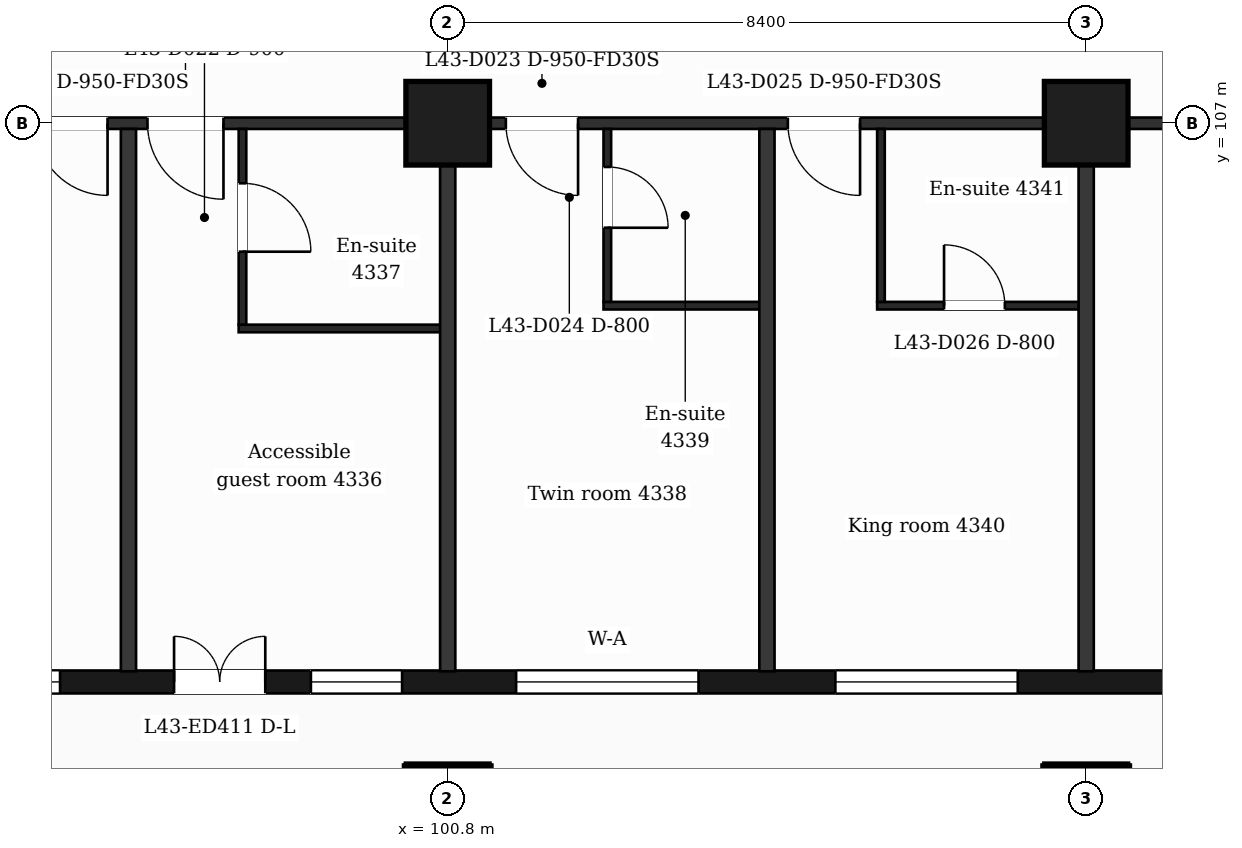
"""IFC4 building model, lengths in metres.
Left out: names, types, materials, properties, quantities, classifications, styles, units other than length and angle.
Written with IfcOpenShell. Run it as: python <this file> out.ifc"""

import sys

from ifc_helpers import new_model, si_unit, direction, frame, frame_2d, origin, origin_2d, place, context, subcontext, project, spatial, rectangle, extrude, element, fill, save


model = new_model("IFC4")
c1 = context("Model", 3, precision=1e-05, world=origin(), true_north=direction((0.0, 1.0)))
c2 = subcontext(c1, "Body", "Model", "MODEL_VIEW")
j1 = project(units=[si_unit("LENGTHUNIT", "METRE"), si_unit("PLANEANGLEUNIT", "RADIAN")], contexts=[c1])
p1 = place(None, origin())
s1 = spatial("IfcSite", under=j1, at=p1, CompositionType="ELEMENT")
p2 = place(p1, origin())
s2 = spatial("IfcBuilding", under=s1, at=p2, CompositionType="ELEMENT")
p3 = place(p2, frame((0.0, 0.0, 181.1)))
s3 = spatial("IfcBuildingStorey", under=s2, at=p3, CompositionType="ELEMENT", Elevation=181.1)
for number, where, z_axis, x_axis in (
    (1, (100.8, 98.0, 0.0), (0.0, 0.0, 1.0), (1.0, 0.0, 0.0)),
    (2, (109.2, 98.0, 0.0), (0.0, 0.0, 1.0), (1.0, 0.0, 0.0)),
    (3, (100.8, 107.0, 0.0), (0.0, 0.0, 1.0), (1.0, 0.0, 0.0)),
    (4, (109.2, 107.0, 0.0), (0.0, 0.0, 1.0), (1.0, 0.0, 0.0)),
):
    element("IfcColumn", number, at=place(p3, frame(where, z_axis=z_axis, x_axis=x_axis)), inside=s3, PredefinedType="COLUMN", context=c2, shape_type="SweptSolid", body=[
        extrude(rectangle(XDim=1.1, YDim=1.1, at=origin_2d()), origin(), (0.0, 0.0, 1.0), 3.7),
    ])
p4 = place(p3, frame((89.85, 99.65, 0.0), z_axis=(0.0, 0.0, 1.0), x_axis=(1.0, 0.0, 0.0)))
e5 = element("IfcWall", 5, at=p4, inside=s3, PredefinedType="SOLIDWALL", context=c2, shape_type="SweptSolid", body=[
    extrude(rectangle(XDim=47.25, YDim=0.3, at=frame_2d((23.625, 0.0))), origin(), (0.0, 0.0, 1.0), 3.38),
])
p5 = place(p4, frame((0.725, 0.0, 0.9)))
e6 = element("IfcOpeningElement", 6, at=p5, cuts=e5, PredefinedType="OPENING", context=c2, shape_type="SweptSolid", body=[
    extrude(rectangle(XDim=1.2, YDim=2.1, at=frame_2d((0.6, 1.05))), frame((0.0, 0.16, 0.0), z_axis=(0.0, -1.0, 0.0), x_axis=(1.0, 0.0, 0.0)), (0.0, 0.0, 1.0), 0.32),
])
p6 = place(p4, frame((3.45, 0.0, 0.9)))
e7 = element("IfcOpeningElement", 7, at=p6, cuts=e5, PredefinedType="OPENING", context=c2, shape_type="SweptSolid", body=[
    extrude(rectangle(XDim=2.4, YDim=2.1, at=frame_2d((1.2, 1.05))), frame((0.0, 0.16, 0.0), z_axis=(0.0, -1.0, 0.0), x_axis=(1.0, 0.0, 0.0)), (0.0, 0.0, 1.0), 0.32),
])
p7 = place(p4, frame((7.35, 0.0, 0.0)))
e8 = element("IfcOpeningElement", 8, at=p7, cuts=e5, PredefinedType="OPENING", context=c2, shape_type="SweptSolid", body=[
    extrude(rectangle(XDim=1.2, YDim=2.4, at=frame_2d((0.6, 1.2))), frame((0.0, 0.16, 0.0), z_axis=(0.0, -1.0, 0.0), x_axis=(1.0, 0.0, 0.0)), (0.0, 0.0, 1.0), 0.32),
])
p8 = place(p4, frame((9.15, 0.0, 0.9)))
e9 = element("IfcOpeningElement", 9, at=p8, cuts=e5, PredefinedType="OPENING", context=c2, shape_type="SweptSolid", body=[
    extrude(rectangle(XDim=1.2, YDim=2.1, at=frame_2d((0.6, 1.05))), frame((0.0, 0.16, 0.0), z_axis=(0.0, -1.0, 0.0), x_axis=(1.0, 0.0, 0.0)), (0.0, 0.0, 1.0), 0.32),
])
p9 = place(p4, frame((11.85, 0.0, 0.9)))
e10 = element("IfcOpeningElement", 10, at=p9, cuts=e5, PredefinedType="OPENING", context=c2, shape_type="SweptSolid", body=[
    extrude(rectangle(XDim=2.4, YDim=2.1, at=frame_2d((1.2, 1.05))), frame((0.0, 0.16, 0.0), z_axis=(0.0, -1.0, 0.0), x_axis=(1.0, 0.0, 0.0)), (0.0, 0.0, 1.0), 0.32),
])
p10 = place(p4, frame((16.05, 0.0, 0.9)))
e11 = element("IfcOpeningElement", 11, at=p10, cuts=e5, PredefinedType="OPENING", context=c2, shape_type="SweptSolid", body=[
    extrude(rectangle(XDim=2.4, YDim=2.1, at=frame_2d((1.2, 1.05))), frame((0.0, 0.16, 0.0), z_axis=(0.0, -1.0, 0.0), x_axis=(1.0, 0.0, 0.0)), (0.0, 0.0, 1.0), 0.32),
])
p11 = place(p4, frame((20.85, 0.0, 0.9)))
e12 = element("IfcOpeningElement", 12, at=p11, cuts=e5, PredefinedType="OPENING", context=c2, shape_type="SweptSolid", body=[
    extrude(rectangle(XDim=1.2, YDim=2.1, at=frame_2d((0.6, 1.05))), frame((0.0, 0.16, 0.0), z_axis=(0.0, -1.0, 0.0), x_axis=(1.0, 0.0, 0.0)), (0.0, 0.0, 1.0), 0.32),
])
p12 = place(p4, frame((25.05, 0.0, 0.9)))
e13 = element("IfcOpeningElement", 13, at=p12, cuts=e5, PredefinedType="OPENING", context=c2, shape_type="SweptSolid", body=[
    extrude(rectangle(XDim=1.2, YDim=2.1, at=frame_2d((0.6, 1.05))), frame((0.0, 0.16, 0.0), z_axis=(0.0, -1.0, 0.0), x_axis=(1.0, 0.0, 0.0)), (0.0, 0.0, 1.0), 0.32),
])
p13 = place(p4, frame((28.65, 0.0, 0.9)))
e14 = element("IfcOpeningElement", 14, at=p13, cuts=e5, PredefinedType="OPENING", context=c2, shape_type="SweptSolid", body=[
    extrude(rectangle(XDim=2.4, YDim=2.1, at=frame_2d((1.2, 1.05))), frame((0.0, 0.16, 0.0), z_axis=(0.0, -1.0, 0.0), x_axis=(1.0, 0.0, 0.0)), (0.0, 0.0, 1.0), 0.32),
])
p14 = place(p4, frame((32.85, 0.0, 0.9)))
e15 = element("IfcOpeningElement", 15, at=p14, cuts=e5, PredefinedType="OPENING", context=c2, shape_type="SweptSolid", body=[
    extrude(rectangle(XDim=2.4, YDim=2.1, at=frame_2d((1.2, 1.05))), frame((0.0, 0.16, 0.0), z_axis=(0.0, -1.0, 0.0), x_axis=(1.0, 0.0, 0.0)), (0.0, 0.0, 1.0), 0.32),
])
p15 = place(p4, frame((37.05, 0.0, 0.9)))
e16 = element("IfcOpeningElement", 16, at=p15, cuts=e5, PredefinedType="OPENING", context=c2, shape_type="SweptSolid", body=[
    extrude(rectangle(XDim=2.4, YDim=2.1, at=frame_2d((1.2, 1.05))), frame((0.0, 0.16, 0.0), z_axis=(0.0, -1.0, 0.0), x_axis=(1.0, 0.0, 0.0)), (0.0, 0.0, 1.0), 0.32),
])
p16 = place(p4, frame((41.25, 0.0, 0.9)))
e17 = element("IfcOpeningElement", 17, at=p16, cuts=e5, PredefinedType="OPENING", context=c2, shape_type="SweptSolid", body=[
    extrude(rectangle(XDim=2.4, YDim=2.1, at=frame_2d((1.2, 1.05))), frame((0.0, 0.16, 0.0), z_axis=(0.0, -1.0, 0.0), x_axis=(1.0, 0.0, 0.0)), (0.0, 0.0, 1.0), 0.32),
])
p17 = place(p4, frame((45.25, 0.0, 0.9)))
e18 = element("IfcOpeningElement", 18, at=p17, cuts=e5, PredefinedType="OPENING", context=c2, shape_type="SweptSolid", body=[
    extrude(rectangle(XDim=1.2, YDim=2.1, at=frame_2d((0.6, 1.05))), frame((0.0, 0.16, 0.0), z_axis=(0.0, -1.0, 0.0), x_axis=(1.0, 0.0, 0.0)), (0.0, 0.0, 1.0), 0.32),
])
p18 = place(p3, frame((98.05, 104.3, 0.0), z_axis=(0.0, 0.0, 1.0), x_axis=(1.0, 0.0, 0.0)))
e19 = element("IfcWall", 19, at=p18, inside=s3, PredefinedType="PARTITIONING", context=c2, shape_type="SweptSolid", body=[
    extrude(rectangle(XDim=2.75, YDim=0.1, at=frame_2d((1.375, 0.0))), origin(), (0.0, 0.0, 1.0), 3.38),
])
p19 = place(p3, frame((102.85, 104.6, 0.0), z_axis=(0.0, 0.0, 1.0), x_axis=(1.0, 0.0, 0.0)))
e20 = element("IfcWall", 20, at=p19, inside=s3, PredefinedType="PARTITIONING", context=c2, shape_type="SweptSolid", body=[
    extrude(rectangle(XDim=2.15, YDim=0.1, at=frame_2d((1.075, 0.0))), origin(), (0.0, 0.0, 1.0), 3.38),
])
p20 = place(p3, frame((106.45, 104.6, 0.0), z_axis=(0.0, 0.0, 1.0), x_axis=(1.0, 0.0, 0.0)))
e21 = element("IfcWall", 21, at=p20, inside=s3, PredefinedType="PARTITIONING", context=c2, shape_type="SweptSolid", body=[
    extrude(rectangle(XDim=2.75, YDim=0.1, at=frame_2d((1.375, 0.0))), origin(), (0.0, 0.0, 1.0), 3.38),
])
p21 = place(p20, frame((0.88, 0.0, 0.0)))
e22 = element("IfcOpeningElement", 22, at=p21, cuts=e21, PredefinedType="OPENING", context=c2, shape_type="SweptSolid", body=[
    extrude(rectangle(XDim=0.8, YDim=2.1, at=frame_2d((0.4, 1.05))), frame((0.0, 0.06, 0.0), z_axis=(0.0, -1.0, 0.0), x_axis=(1.0, 0.0, 0.0)), (0.0, 0.0, 1.0), 0.12),
])
p22 = place(p3, frame((87.018, 107.0, 0.0), z_axis=(0.0, 0.0, 1.0), x_axis=(1.0, 0.0, 0.0)))
e23 = element("IfcWall", 23, at=p22, inside=s3, PredefinedType="PARTITIONING", context=c2, shape_type="SweptSolid", body=[
    extrude(rectangle(XDim=52.765, YDim=0.15, at=frame_2d((26.382, 0.0))), origin(), (0.0, 0.0, 1.0), 3.38),
])
p23 = place(p22, frame((1.276, 0.0, 0.0)))
e24 = element("IfcOpeningElement", 24, at=p23, cuts=e23, PredefinedType="OPENING", context=c2, shape_type="SweptSolid", body=[
    extrude(rectangle(XDim=0.95, YDim=2.1, at=frame_2d((0.475, 1.05))), frame((0.0, 0.085, 0.0), z_axis=(0.0, -1.0, 0.0), x_axis=(1.0, 0.0, 0.0)), (0.0, 0.0, 1.0), 0.17),
])
p24 = place(p22, frame((8.357, 0.0, 0.0)))
e25 = element("IfcOpeningElement", 25, at=p24, cuts=e23, PredefinedType="OPENING", context=c2, shape_type="SweptSolid", body=[
    extrude(rectangle(XDim=0.95, YDim=2.1, at=frame_2d((0.475, 1.05))), frame((0.0, 0.085, 0.0), z_axis=(0.0, -1.0, 0.0), x_axis=(1.0, 0.0, 0.0)), (0.0, 0.0, 1.0), 0.17),
])
p25 = place(p22, frame((9.832, 0.0, 0.0)))
e26 = element("IfcOpeningElement", 26, at=p25, cuts=e23, PredefinedType="OPENING", context=c2, shape_type="SweptSolid", body=[
    extrude(rectangle(XDim=1.0, YDim=2.1, at=frame_2d((0.5, 1.05))), frame((0.0, 0.085, 0.0), z_axis=(0.0, -1.0, 0.0), x_axis=(1.0, 0.0, 0.0)), (0.0, 0.0, 1.0), 0.17),
])
p26 = place(p22, frame((14.547, 0.0, 0.0)))
e27 = element("IfcOpeningElement", 27, at=p26, cuts=e23, PredefinedType="OPENING", context=c2, shape_type="SweptSolid", body=[
    extrude(rectangle(XDim=0.95, YDim=2.1, at=frame_2d((0.475, 1.05))), frame((0.0, 0.085, 0.0), z_axis=(0.0, -1.0, 0.0), x_axis=(1.0, 0.0, 0.0)), (0.0, 0.0, 1.0), 0.17),
])
p27 = place(p22, frame((18.257, 0.0, 0.0)))
e28 = element("IfcOpeningElement", 28, at=p27, cuts=e23, PredefinedType="OPENING", context=c2, shape_type="SweptSolid", body=[
    extrude(rectangle(XDim=0.95, YDim=2.1, at=frame_2d((0.475, 1.05))), frame((0.0, 0.085, 0.0), z_axis=(0.0, -1.0, 0.0), x_axis=(1.0, 0.0, 0.0)), (0.0, 0.0, 1.0), 0.17),
])
p28 = place(p22, frame((25.212, 0.0, 0.0)))
e29 = element("IfcOpeningElement", 29, at=p28, cuts=e23, PredefinedType="OPENING", context=c2, shape_type="SweptSolid", body=[
    extrude(rectangle(XDim=1.0, YDim=2.1, at=frame_2d((0.5, 1.05))), frame((0.0, 0.085, 0.0), z_axis=(0.0, -1.0, 0.0), x_axis=(1.0, 0.0, 0.0)), (0.0, 0.0, 1.0), 0.17),
])
p29 = place(p22, frame((37.267, 0.0, 0.0)))
e30 = element("IfcOpeningElement", 30, at=p29, cuts=e23, PredefinedType="OPENING", context=c2, shape_type="SweptSolid", body=[
    extrude(rectangle(XDim=0.95, YDim=2.1, at=frame_2d((0.475, 1.05))), frame((0.0, 0.085, 0.0), z_axis=(0.0, -1.0, 0.0), x_axis=(1.0, 0.0, 0.0)), (0.0, 0.0, 1.0), 0.17),
])
p30 = place(p22, frame((41.957, 0.0, 0.0)))
e31 = element("IfcOpeningElement", 31, at=p30, cuts=e23, PredefinedType="OPENING", context=c2, shape_type="SweptSolid", body=[
    extrude(rectangle(XDim=0.95, YDim=2.1, at=frame_2d((0.475, 1.05))), frame((0.0, 0.085, 0.0), z_axis=(0.0, -1.0, 0.0), x_axis=(1.0, 0.0, 0.0)), (0.0, 0.0, 1.0), 0.17),
])
p31 = place(p22, frame((45.632, 0.0, 0.0)))
e32 = element("IfcOpeningElement", 32, at=p31, cuts=e23, PredefinedType="OPENING", context=c2, shape_type="SweptSolid", body=[
    extrude(rectangle(XDim=0.95, YDim=2.1, at=frame_2d((0.475, 1.05))), frame((0.0, 0.085, 0.0), z_axis=(0.0, -1.0, 0.0), x_axis=(1.0, 0.0, 0.0)), (0.0, 0.0, 1.0), 0.17),
])
p32 = place(p22, frame((48.767, 0.0, 0.0)))
e33 = element("IfcOpeningElement", 33, at=p32, cuts=e23, PredefinedType="OPENING", context=c2, shape_type="SweptSolid", body=[
    extrude(rectangle(XDim=0.95, YDim=2.1, at=frame_2d((0.475, 1.05))), frame((0.0, 0.085, 0.0), z_axis=(0.0, -1.0, 0.0), x_axis=(1.0, 0.0, 0.0)), (0.0, 0.0, 1.0), 0.17),
])
p33 = place(p3, frame((96.6, 99.79, 0.0), z_axis=(0.0, 0.0, 1.0), x_axis=(0.0, 1.0, 0.0)))
e34 = element("IfcWall", 34, at=p33, inside=s3, PredefinedType="PARTITIONING", context=c2, shape_type="SweptSolid", body=[
    extrude(rectangle(XDim=7.135, YDim=0.2, at=frame_2d((3.567, 0.0))), origin(), (0.0, 0.0, 1.0), 3.38),
])
p34 = place(p3, frame((98.1, 104.35, 0.0), z_axis=(0.0, 0.0, 1.0), x_axis=(0.0, 1.0, 0.0)))
e35 = element("IfcWall", 35, at=p34, inside=s3, PredefinedType="PARTITIONING", context=c2, shape_type="SweptSolid", body=[
    extrude(rectangle(XDim=2.575, YDim=0.1, at=frame_2d((1.288, 0.0))), origin(), (0.0, 0.0, 1.0), 3.38),
])
p35 = place(p34, frame((0.96, 0.0, 0.0)))
e36 = element("IfcOpeningElement", 36, at=p35, cuts=e35, PredefinedType="OPENING", context=c2, shape_type="SweptSolid", body=[
    extrude(rectangle(XDim=0.9, YDim=2.1, at=frame_2d((0.45, 1.05))), frame((0.0, 0.06, 0.0), z_axis=(0.0, -1.0, 0.0), x_axis=(1.0, 0.0, 0.0)), (0.0, 0.0, 1.0), 0.12),
])
p36 = place(p3, frame((100.8, 99.79, 0.0), z_axis=(0.0, 0.0, 1.0), x_axis=(0.0, 1.0, 0.0)))
e37 = element("IfcWall", 37, at=p36, inside=s3, PredefinedType="PARTITIONING", context=c2, shape_type="SweptSolid", body=[
    extrude(rectangle(XDim=7.135, YDim=0.2, at=frame_2d((3.567, 0.0))), origin(), (0.0, 0.0, 1.0), 3.38),
])
p37 = place(p3, frame((102.9, 104.65, 0.0), z_axis=(0.0, 0.0, 1.0), x_axis=(0.0, 1.0, 0.0)))
e38 = element("IfcWall", 38, at=p37, inside=s3, PredefinedType="PARTITIONING", context=c2, shape_type="SweptSolid", body=[
    extrude(rectangle(XDim=2.275, YDim=0.1, at=frame_2d((1.138, 0.0))), origin(), (0.0, 0.0, 1.0), 3.38),
])
p38 = place(p37, frame((0.975, 0.0, 0.0)))
e39 = element("IfcOpeningElement", 39, at=p38, cuts=e38, PredefinedType="OPENING", context=c2, shape_type="SweptSolid", body=[
    extrude(rectangle(XDim=0.8, YDim=2.1, at=frame_2d((0.4, 1.05))), frame((0.0, 0.06, 0.0), z_axis=(0.0, -1.0, 0.0), x_axis=(1.0, 0.0, 0.0)), (0.0, 0.0, 1.0), 0.12),
])
p39 = place(p3, frame((105.0, 99.79, 0.0), z_axis=(0.0, 0.0, 1.0), x_axis=(0.0, 1.0, 0.0)))
e40 = element("IfcWall", 40, at=p39, inside=s3, PredefinedType="PARTITIONING", context=c2, shape_type="SweptSolid", body=[
    extrude(rectangle(XDim=7.135, YDim=0.2, at=frame_2d((3.567, 0.0))), origin(), (0.0, 0.0, 1.0), 3.38),
])
p40 = place(p3, frame((106.5, 104.65, 0.0), z_axis=(0.0, 0.0, 1.0), x_axis=(0.0, 1.0, 0.0)))
e41 = element("IfcWall", 41, at=p40, inside=s3, PredefinedType="PARTITIONING", context=c2, shape_type="SweptSolid", body=[
    extrude(rectangle(XDim=2.275, YDim=0.1, at=frame_2d((1.138, 0.0))), origin(), (0.0, 0.0, 1.0), 3.38),
])
p41 = place(p3, frame((109.2, 99.79, 0.0), z_axis=(0.0, 0.0, 1.0), x_axis=(0.0, 1.0, 0.0)))
e42 = element("IfcWall", 42, at=p41, inside=s3, PredefinedType="PARTITIONING", context=c2, shape_type="SweptSolid", body=[
    extrude(rectangle(XDim=7.135, YDim=0.2, at=frame_2d((3.567, 0.0))), origin(), (0.0, 0.0, 1.0), 3.38),
])
p42 = place(p6, origin())
e43 = element("IfcWindow", 43, at=p42, inside=s3, PartitioningType="SINGLE_PANEL", PredefinedType="WINDOW", context=c2, shape_type="SweptSolid", body=[
    extrude(rectangle(XDim=2.4, YDim=2.1, at=frame_2d((1.2, 1.05))), frame((0.0, 0.03, 0.0), z_axis=(0.0, -1.0, 0.0), x_axis=(1.0, 0.0, 0.0)), (0.0, 0.0, 1.0), 0.06),
])
fill(e7, e43)
p43 = place(p7, origin())
e44 = element("IfcDoor", 44, at=p43, inside=s3, OperationType="DOUBLE_DOOR_SINGLE_SWING", PredefinedType="DOOR", context=c2, shape_type="SweptSolid", body=[
    extrude(rectangle(XDim=1.2, YDim=2.4, at=frame_2d((0.6, 1.2))), frame((0.0, 0.025, 0.0), z_axis=(0.0, -1.0, 0.0), x_axis=(1.0, 0.0, 0.0)), (0.0, 0.0, 1.0), 0.05),
])
fill(e8, e44)
p44 = place(p8, origin())
e45 = element("IfcWindow", 45, at=p44, inside=s3, PartitioningType="SINGLE_PANEL", PredefinedType="WINDOW", context=c2, shape_type="SweptSolid", body=[
    extrude(rectangle(XDim=1.2, YDim=2.1, at=frame_2d((0.6, 1.05))), frame((0.0, 0.03, 0.0), z_axis=(0.0, -1.0, 0.0), x_axis=(1.0, 0.0, 0.0)), (0.0, 0.0, 1.0), 0.06),
])
fill(e9, e45)
p45 = place(p9, origin())
e46 = element("IfcWindow", 46, at=p45, inside=s3, PartitioningType="SINGLE_PANEL", PredefinedType="WINDOW", context=c2, shape_type="SweptSolid", body=[
    extrude(rectangle(XDim=2.4, YDim=2.1, at=frame_2d((1.2, 1.05))), frame((0.0, 0.03, 0.0), z_axis=(0.0, -1.0, 0.0), x_axis=(1.0, 0.0, 0.0)), (0.0, 0.0, 1.0), 0.06),
])
fill(e10, e46)
p46 = place(p10, origin())
e47 = element("IfcWindow", 47, at=p46, inside=s3, PartitioningType="SINGLE_PANEL", PredefinedType="WINDOW", context=c2, shape_type="SweptSolid", body=[
    extrude(rectangle(XDim=2.4, YDim=2.1, at=frame_2d((1.2, 1.05))), frame((0.0, 0.03, 0.0), z_axis=(0.0, -1.0, 0.0), x_axis=(1.0, 0.0, 0.0)), (0.0, 0.0, 1.0), 0.06),
])
fill(e11, e47)
p47 = place(p24, origin())
e48 = element("IfcDoor", 48, at=p47, inside=s3, OperationType="SINGLE_SWING_RIGHT", PredefinedType="DOOR", context=c2, shape_type="SweptSolid", body=[
    extrude(rectangle(XDim=0.95, YDim=2.1, at=frame_2d((0.475, 1.05))), frame((0.0, 0.025, 0.0), z_axis=(0.0, -1.0, 0.0), x_axis=(1.0, 0.0, 0.0)), (0.0, 0.0, 1.0), 0.05),
])
fill(e25, e48)
p48 = place(p25, origin())
e49 = element("IfcDoor", 49, at=p48, inside=s3, OperationType="SINGLE_SWING_RIGHT", PredefinedType="DOOR", context=c2, shape_type="SweptSolid", body=[
    extrude(rectangle(XDim=1.0, YDim=2.1, at=frame_2d((0.5, 1.05))), frame((0.0, 0.025, 0.0), z_axis=(0.0, -1.0, 0.0), x_axis=(1.0, 0.0, 0.0)), (0.0, 0.0, 1.0), 0.05),
])
fill(e26, e49)
p49 = place(p35, origin())
e50 = element("IfcDoor", 50, at=p49, inside=s3, OperationType="SINGLE_SWING_LEFT", PredefinedType="DOOR", context=c2, shape_type="SweptSolid", body=[
    extrude(rectangle(XDim=0.9, YDim=2.1, at=frame_2d((0.45, 1.05))), frame((0.0, 0.025, 0.0), z_axis=(0.0, -1.0, 0.0), x_axis=(1.0, 0.0, 0.0)), (0.0, 0.0, 1.0), 0.05),
])
fill(e36, e50)
p50 = place(p26, origin())
e51 = element("IfcDoor", 51, at=p50, inside=s3, OperationType="SINGLE_SWING_RIGHT", PredefinedType="DOOR", context=c2, shape_type="SweptSolid", body=[
    extrude(rectangle(XDim=0.95, YDim=2.1, at=frame_2d((0.475, 1.05))), frame((0.0, 0.025, 0.0), z_axis=(0.0, -1.0, 0.0), x_axis=(1.0, 0.0, 0.0)), (0.0, 0.0, 1.0), 0.05),
])
fill(e27, e51)
p51 = place(p38, origin())
e52 = element("IfcDoor", 52, at=p51, inside=s3, OperationType="SINGLE_SWING_LEFT", PredefinedType="DOOR", context=c2, shape_type="SweptSolid", body=[
    extrude(rectangle(XDim=0.8, YDim=2.1, at=frame_2d((0.4, 1.05))), frame((0.0, 0.025, 0.0), z_axis=(0.0, -1.0, 0.0), x_axis=(1.0, 0.0, 0.0)), (0.0, 0.0, 1.0), 0.05),
])
fill(e39, e52)
p52 = place(p27, origin())
e53 = element("IfcDoor", 53, at=p52, inside=s3, OperationType="SINGLE_SWING_RIGHT", PredefinedType="DOOR", context=c2, shape_type="SweptSolid", body=[
    extrude(rectangle(XDim=0.95, YDim=2.1, at=frame_2d((0.475, 1.05))), frame((0.0, 0.025, 0.0), z_axis=(0.0, -1.0, 0.0), x_axis=(1.0, 0.0, 0.0)), (0.0, 0.0, 1.0), 0.05),
])
fill(e28, e53)
p53 = place(p21, origin())
e54 = element("IfcDoor", 54, at=p53, inside=s3, OperationType="SINGLE_SWING_LEFT", PredefinedType="DOOR", context=c2, shape_type="SweptSolid", body=[
    extrude(rectangle(XDim=0.8, YDim=2.1, at=frame_2d((0.4, 1.05))), frame((0.0, 0.025, 0.0), z_axis=(0.0, -1.0, 0.0), x_axis=(1.0, 0.0, 0.0)), (0.0, 0.0, 1.0), 0.05),
])
fill(e22, e54)
save(model, sys.argv[1])
